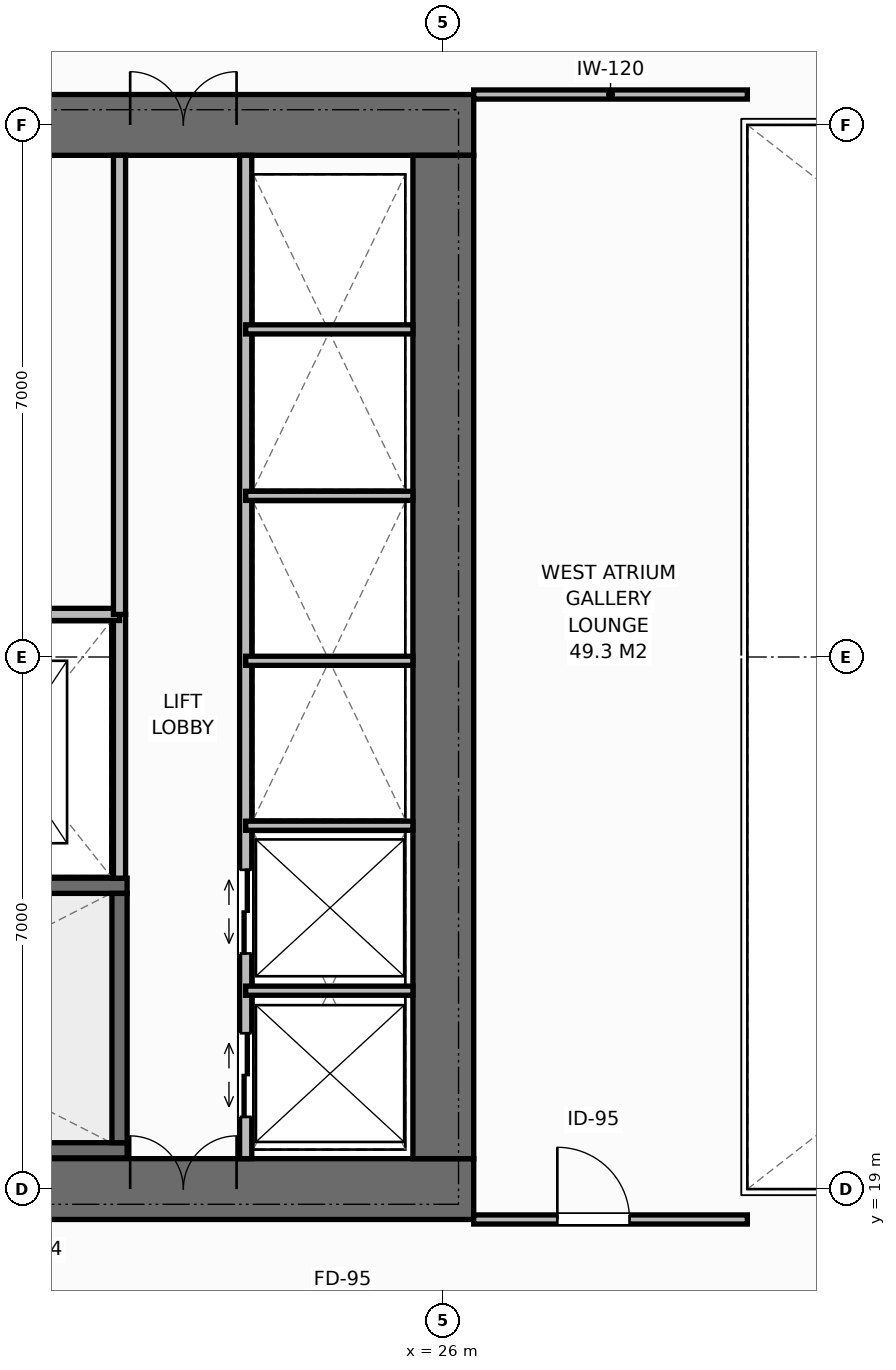
"""IFC4 building model, lengths in metres.
Left out: names, types, materials, properties, quantities, classifications, styles, units other than length and angle.
Written with IfcOpenShell. Run it as: python <this file> out.ifc"""

import sys

from ifc_helpers import new_model, si_unit, direction, frame, frame_2d, origin, place, context, subcontext, project, spatial, rectangle, extrude, element, fill, save


model = new_model("IFC4")
c1 = context("Model", 3, precision=1e-05, world=origin(), true_north=direction((0.0, 1.0)))
c2 = subcontext(c1, "Body", "Model", "MODEL_VIEW")
j1 = project(units=[si_unit("LENGTHUNIT", "METRE"), si_unit("PLANEANGLEUNIT", "RADIAN")], contexts=[c1])
p1 = place(None, origin())
s1 = spatial("IfcSite", under=j1, at=p1, CompositionType="ELEMENT")
p2 = place(p1, origin())
s2 = spatial("IfcBuilding", under=s1, at=p2, CompositionType="ELEMENT")
p3 = place(p2, frame((0.0, 0.0, 39.2)))
s3 = spatial("IfcBuildingStorey", under=s2, at=p3, CompositionType="ELEMENT", Elevation=39.2)
p4 = place(p3, frame((12.6, 19.0, 0.0), z_axis=(0.0, 0.0, 1.0), x_axis=(1.0, 0.0, 0.0)))
e1 = element("IfcWall", 1, at=p4, inside=s3, PredefinedType="SHEAR", context=c2, shape_type="SweptSolid", body=[
    extrude(rectangle(XDim=13.8, YDim=0.8, at=frame_2d((6.9, 0.0))), origin(), (0.0, 0.0, 1.0), 3.8),
])
p5 = place(p4, frame((9.28, 0.0, 0.0)))
e2 = element("IfcOpeningElement", 2, at=p5, cuts=e1, PredefinedType="OPENING", context=c2, shape_type="SweptSolid", body=[
    extrude(rectangle(XDim=1.4, YDim=2.2, at=frame_2d((0.7, 1.1))), frame((0.0, 0.41, 0.0), z_axis=(0.0, -1.0, 0.0), x_axis=(1.0, 0.0, 0.0)), (0.0, 0.0, 1.0), 0.82),
])
p6 = place(p3, frame((12.6, 33.0, 0.0), z_axis=(0.0, 0.0, 1.0), x_axis=(1.0, 0.0, 0.0)))
e3 = element("IfcWall", 3, at=p6, inside=s3, PredefinedType="SHEAR", context=c2, shape_type="SweptSolid", body=[
    extrude(rectangle(XDim=13.8, YDim=0.8, at=frame_2d((6.9, 0.0))), origin(), (0.0, 0.0, 1.0), 3.8),
])
p7 = place(p6, frame((1.3, 0.0, 0.0)))
e4 = element("IfcOpeningElement", 4, at=p7, cuts=e3, PredefinedType="OPENING", context=c2, shape_type="SweptSolid", body=[
    extrude(rectangle(XDim=0.9, YDim=2.15, at=frame_2d((0.45, 1.075))), frame((0.0, 0.41, 0.0), z_axis=(0.0, -1.0, 0.0), x_axis=(1.0, 0.0, 0.0)), (0.0, 0.0, 1.0), 0.82),
])
p8 = place(p6, frame((3.2, 0.0, 0.0)))
e5 = element("IfcOpeningElement", 5, at=p8, cuts=e3, PredefinedType="OPENING", context=c2, shape_type="SweptSolid", body=[
    extrude(rectangle(XDim=0.9, YDim=2.15, at=frame_2d((0.45, 1.075))), frame((0.0, 0.41, 0.0), z_axis=(0.0, -1.0, 0.0), x_axis=(1.0, 0.0, 0.0)), (0.0, 0.0, 1.0), 0.82),
])
p9 = place(p6, frame((5.0, 0.0, 0.0)))
e6 = element("IfcOpeningElement", 6, at=p9, cuts=e3, PredefinedType="OPENING", context=c2, shape_type="SweptSolid", body=[
    extrude(rectangle(XDim=0.9, YDim=2.15, at=frame_2d((0.45, 1.075))), frame((0.0, 0.41, 0.0), z_axis=(0.0, -1.0, 0.0), x_axis=(1.0, 0.0, 0.0)), (0.0, 0.0, 1.0), 0.82),
])
p10 = place(p6, frame((6.9, 0.0, 0.0)))
e7 = element("IfcOpeningElement", 7, at=p10, cuts=e3, PredefinedType="OPENING", context=c2, shape_type="SweptSolid", body=[
    extrude(rectangle(XDim=0.9, YDim=2.15, at=frame_2d((0.45, 1.075))), frame((0.0, 0.41, 0.0), z_axis=(0.0, -1.0, 0.0), x_axis=(1.0, 0.0, 0.0)), (0.0, 0.0, 1.0), 0.82),
])
p11 = place(p6, frame((9.28, 0.0, 0.0)))
e8 = element("IfcOpeningElement", 8, at=p11, cuts=e3, PredefinedType="OPENING", context=c2, shape_type="SweptSolid", body=[
    extrude(rectangle(XDim=1.4, YDim=2.2, at=frame_2d((0.7, 1.1))), frame((0.0, 0.41, 0.0), z_axis=(0.0, -1.0, 0.0), x_axis=(1.0, 0.0, 0.0)), (0.0, 0.0, 1.0), 0.82),
])
p12 = place(p3, frame((26.0, 19.4, 0.0), z_axis=(0.0, 0.0, 1.0), x_axis=(0.0, 1.0, 0.0)))
e9 = element("IfcWall", 9, at=p12, inside=s3, PredefinedType="SHEAR", context=c2, shape_type="SweptSolid", body=[
    extrude(rectangle(XDim=13.2, YDim=0.8, at=frame_2d((6.6, 0.0))), origin(), (0.0, 0.0, 1.0), 3.8),
])
p13 = place(p3, frame((13.41, 19.51, 0.0), z_axis=(0.0, 0.0, 1.0), x_axis=(1.0, 0.0, 0.0)))
e10 = element("IfcWall", 10, at=p13, inside=s3, PredefinedType="SHEAR", context=c2, shape_type="SweptSolid", body=[
    extrude(rectangle(XDim=8.43, YDim=0.2, at=frame_2d((4.215, 0.0))), origin(), (0.0, 0.0, 1.0), 3.8),
])
p14 = place(p3, frame((13.41, 22.99, 0.0), z_axis=(0.0, 0.0, 1.0), x_axis=(1.0, 0.0, 0.0)))
e11 = element("IfcWall", 11, at=p14, inside=s3, PredefinedType="SHEAR", context=c2, shape_type="SweptSolid", body=[
    extrude(rectangle(XDim=8.43, YDim=0.2, at=frame_2d((4.215, 0.0))), origin(), (0.0, 0.0, 1.0), 3.8),
])
p15 = place(p14, frame((0.45, 0.0, 0.0)))
e12 = element("IfcOpeningElement", 12, at=p15, cuts=e11, PredefinedType="OPENING", context=c2, shape_type="SweptSolid", body=[
    extrude(rectangle(XDim=1.0, YDim=2.15, at=frame_2d((0.5, 1.075))), frame((0.0, 0.11, 0.0), z_axis=(0.0, -1.0, 0.0), x_axis=(1.0, 0.0, 0.0)), (0.0, 0.0, 1.0), 0.22),
])
p16 = place(p3, frame((21.74, 19.61, 0.0), z_axis=(0.0, 0.0, 1.0), x_axis=(0.0, 1.0, 0.0)))
e13 = element("IfcWall", 13, at=p16, inside=s3, PredefinedType="SHEAR", context=c2, shape_type="SweptSolid", body=[
    extrude(rectangle(XDim=3.28, YDim=0.2, at=frame_2d((1.64, 0.0))), origin(), (0.0, 0.0, 1.0), 3.8),
])
p17 = place(p3, frame((21.74, 23.09, 0.0), z_axis=(0.0, 0.0, 1.0), x_axis=(0.0, 1.0, 0.0)))
e14 = element("IfcWall", 14, at=p17, inside=s3, PredefinedType="STANDARD", context=c2, shape_type="SweptSolid", body=[
    extrude(rectangle(XDim=3.47, YDim=0.16, at=frame_2d((1.735, 0.0))), origin(), (0.0, 0.0, 1.0), 3.55),
])
p18 = place(p3, frame((13.4, 26.56, 0.0), z_axis=(0.0, 0.0, 1.0), x_axis=(1.0, 0.0, 0.0)))
e15 = element("IfcWall", 15, at=p18, inside=s3, PredefinedType="STANDARD", context=c2, shape_type="SweptSolid", body=[
    extrude(rectangle(XDim=8.34, YDim=0.16, at=frame_2d((4.17, 0.0))), origin(), (0.0, 0.0, 1.0), 3.55),
])
p19 = place(p3, frame((21.74, 26.56, 0.0), z_axis=(0.0, 0.0, 1.0), x_axis=(0.0, 1.0, 0.0)))
e16 = element("IfcWall", 16, at=p19, inside=s3, PredefinedType="STANDARD", context=c2, shape_type="SweptSolid", body=[
    extrude(rectangle(XDim=6.04, YDim=0.16, at=frame_2d((3.02, 0.0))), origin(), (0.0, 0.0, 1.0), 3.55),
])
p20 = place(p3, frame((23.4, 19.4, 0.0), z_axis=(0.0, 0.0, 1.0), x_axis=(0.0, 1.0, 0.0)))
e17 = element("IfcWall", 17, at=p20, inside=s3, PredefinedType="STANDARD", context=c2, shape_type="SweptSolid", body=[
    extrude(rectangle(XDim=13.2, YDim=0.16, at=frame_2d((6.6, 0.0))), origin(), (0.0, 0.0, 1.0), 3.55),
])
p21 = place(p20, frame((0.55, 0.0, 0.0)))
e18 = element("IfcOpeningElement", 18, at=p21, cuts=e17, PredefinedType="OPENING", context=c2, shape_type="SweptSolid", body=[
    extrude(rectangle(XDim=1.1, YDim=2.2, at=frame_2d((0.55, 1.1))), frame((0.0, 0.09, 0.0), z_axis=(0.0, -1.0, 0.0), x_axis=(1.0, 0.0, 0.0)), (0.0, 0.0, 1.0), 0.18),
])
p22 = place(p20, frame((2.7, 0.0, 0.0)))
e19 = element("IfcOpeningElement", 19, at=p22, cuts=e17, PredefinedType="OPENING", context=c2, shape_type="SweptSolid", body=[
    extrude(rectangle(XDim=1.1, YDim=2.2, at=frame_2d((0.55, 1.1))), frame((0.0, 0.09, 0.0), z_axis=(0.0, -1.0, 0.0), x_axis=(1.0, 0.0, 0.0)), (0.0, 0.0, 1.0), 0.18),
])
for number, where, z_axis, x_axis in (
    (20, (23.4, 21.61, 0.0), (0.0, 0.0, 1.0), (1.0, 0.0, 0.0)),
    (21, (23.4, 23.78, 0.0), (0.0, 0.0, 1.0), (1.0, 0.0, 0.0)),
    (22, (23.4, 25.95, 0.0), (0.0, 0.0, 1.0), (1.0, 0.0, 0.0)),
    (23, (23.4, 28.12, 0.0), (0.0, 0.0, 1.0), (1.0, 0.0, 0.0)),
    (24, (23.4, 30.31, 0.0), (0.0, 0.0, 1.0), (1.0, 0.0, 0.0)),
):
    element("IfcWall", number, at=place(p3, frame(where, z_axis=z_axis, x_axis=x_axis)), inside=s3, PredefinedType="PARTITIONING", context=c2, shape_type="SweptSolid", body=[
        extrude(rectangle(XDim=2.2, YDim=0.12, at=frame_2d((1.1, 0.0))), origin(), (0.0, 0.0, 1.0), 3.55),
    ])
p23 = place(p3, frame((26.4, 33.4, 0.0), z_axis=(0.0, 0.0, 1.0), x_axis=(1.0, 0.0, 0.0)))
e25 = element("IfcWall", 25, at=p23, inside=s3, PredefinedType="PARTITIONING", context=c2, shape_type="SweptSolid", body=[
    extrude(rectangle(XDim=3.6, YDim=0.12, at=frame_2d((1.8, 0.0))), origin(), (0.0, 0.0, 1.0), 3.55),
])
p24 = place(p3, frame((26.4, 18.6, 0.0), z_axis=(0.0, 0.0, 1.0), x_axis=(1.0, 0.0, 0.0)))
e26 = element("IfcWall", 26, at=p24, inside=s3, PredefinedType="PARTITIONING", context=c2, shape_type="SweptSolid", body=[
    extrude(rectangle(XDim=3.6, YDim=0.12, at=frame_2d((1.8, 0.0))), origin(), (0.0, 0.0, 1.0), 3.55),
])
p25 = place(p24, frame((1.1, 0.0, 0.0)))
e27 = element("IfcOpeningElement", 27, at=p25, cuts=e26, PredefinedType="OPENING", context=c2, shape_type="SweptSolid", body=[
    extrude(rectangle(XDim=0.95, YDim=2.15, at=frame_2d((0.475, 1.075))), frame((0.0, 0.07, 0.0), z_axis=(0.0, -1.0, 0.0), x_axis=(1.0, 0.0, 0.0)), (0.0, 0.0, 1.0), 0.14),
])
p26 = place(p5, origin())
e28 = element("IfcDoor", 28, at=p26, inside=s3, OperationType="DOUBLE_DOOR_SINGLE_SWING", PredefinedType="DOOR", context=c2, shape_type="SweptSolid", body=[
    extrude(rectangle(XDim=1.4, YDim=2.2, at=frame_2d((0.7, 1.1))), frame((0.0, 0.125, 0.0), z_axis=(0.0, -1.0, 0.0), x_axis=(1.0, 0.0, 0.0)), (0.0, 0.0, 1.0), 0.05),
])
fill(e2, e28)
p27 = place(p11, origin())
e29 = element("IfcDoor", 29, at=p27, inside=s3, OperationType="DOUBLE_DOOR_SINGLE_SWING", PredefinedType="DOOR", context=c2, shape_type="SweptSolid", body=[
    extrude(rectangle(XDim=1.4, YDim=2.2, at=frame_2d((0.7, 1.1))), frame((0.0, -0.075, 0.0), z_axis=(0.0, -1.0, 0.0), x_axis=(1.0, 0.0, 0.0)), (0.0, 0.0, 1.0), 0.05),
])
fill(e8, e29)
p28 = place(p21, origin())
e30 = element("IfcDoor", 30, at=p28, inside=s3, OperationType="DOUBLE_DOOR_SLIDING", PredefinedType="DOOR", context=c2, shape_type="SweptSolid", body=[
    extrude(rectangle(XDim=1.1, YDim=2.2, at=frame_2d((0.55, 1.1))), frame((0.0, 0.025, 0.0), z_axis=(0.0, -1.0, 0.0), x_axis=(1.0, 0.0, 0.0)), (0.0, 0.0, 1.0), 0.05),
])
fill(e18, e30)
p29 = place(p22, origin())
e31 = element("IfcDoor", 31, at=p29, inside=s3, OperationType="DOUBLE_DOOR_SLIDING", PredefinedType="DOOR", context=c2, shape_type="SweptSolid", body=[
    extrude(rectangle(XDim=1.1, YDim=2.2, at=frame_2d((0.55, 1.1))), frame((0.0, 0.025, 0.0), z_axis=(0.0, -1.0, 0.0), x_axis=(1.0, 0.0, 0.0)), (0.0, 0.0, 1.0), 0.05),
])
fill(e19, e31)
p30 = place(p25, origin())
e32 = element("IfcDoor", 32, at=p30, inside=s3, OperationType="SINGLE_SWING_LEFT", PredefinedType="DOOR", context=c2, shape_type="SweptSolid", body=[
    extrude(rectangle(XDim=0.95, YDim=2.15, at=frame_2d((0.475, 1.075))), frame((0.0, 0.025, 0.0), z_axis=(0.0, -1.0, 0.0), x_axis=(1.0, 0.0, 0.0)), (0.0, 0.0, 1.0), 0.05),
])
fill(e27, e32)
save(model, sys.argv[1])
